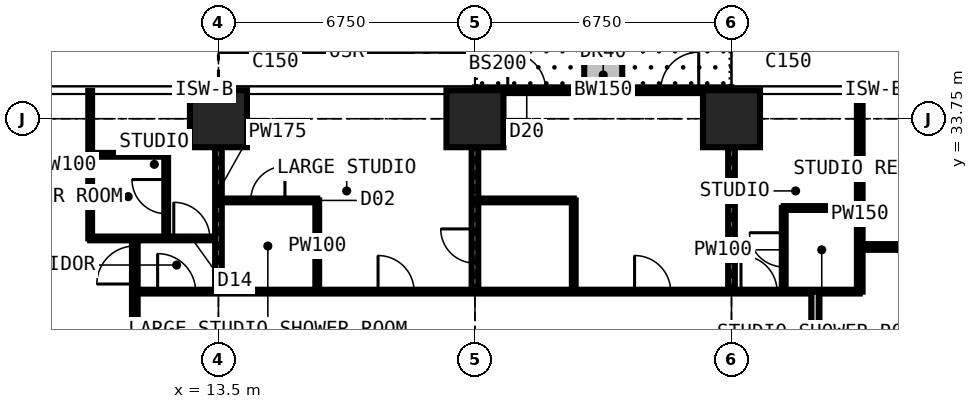
"""IFC4 building model, lengths in metres.
Left out: names, types, materials, properties, quantities, classifications, styles, units other than length and angle.
Written with IfcOpenShell. Run it as: python <this file> out.ifc"""

import sys

from ifc_helpers import new_model, si_unit, direction, frame, frame_2d, origin, origin_2d, place, context, subcontext, project, spatial, rectangle, extrude, element, fill, save


model = new_model("IFC4")
c1 = context("Model", 3, precision=1e-05, world=origin(), true_north=direction((0.0, 1.0)))
c2 = subcontext(c1, "Body", "Model", "MODEL_VIEW")
j1 = project(units=[si_unit("LENGTHUNIT", "METRE"), si_unit("PLANEANGLEUNIT", "RADIAN")], contexts=[c1])
p1 = place(None, origin())
s1 = spatial("IfcSite", under=j1, at=p1, CompositionType="ELEMENT")
p2 = place(p1, origin())
s2 = spatial("IfcBuilding", under=s1, at=p2, CompositionType="ELEMENT")
p3 = place(p2, frame((0.0, 0.0, 112.5)))
s3 = spatial("IfcBuildingStorey", under=s2, at=p3, CompositionType="ELEMENT", Elevation=112.5)
for number, where, z_axis, x_axis in (
    (1, (13.5, 33.75, 0.0), (0.0, 0.0, 1.0), (1.0, 0.0, 0.0)),
    (2, (20.25, 33.75, 0.0), (0.0, 0.0, 1.0), (1.0, 0.0, 0.0)),
    (3, (27.0, 33.75, 0.0), (0.0, 0.0, 1.0), (1.0, 0.0, 0.0)),
):
    element("IfcColumn", number, at=place(p3, frame(where, z_axis=z_axis, x_axis=x_axis)), inside=s3, PredefinedType="COLUMN", context=c2, shape_type="SweptSolid", body=[
        extrude(rectangle(XDim=1.5, YDim=1.5, at=origin_2d()), origin(), (0.0, 0.0, 1.0), 3.6),
    ])
p4 = place(p3, frame((20.25, 34.5, 0.0), z_axis=(0.0, 0.0, 1.0), x_axis=(1.0, 0.0, 0.0)))
e4 = element("IfcWall", 4, at=p4, inside=s3, PredefinedType="SOLIDWALL", context=c2, shape_type="SweptSolid", body=[
    extrude(rectangle(XDim=6.75, YDim=0.15, at=frame_2d((3.375, 0.0))), origin(), (0.0, 0.0, 1.0), 3.375),
])
p5 = place(p4, frame((0.863, 0.0, 0.0)))
e5 = element("IfcOpeningElement", 5, at=p5, cuts=e4, PredefinedType="OPENING", context=c2, shape_type="SweptSolid", body=[
    extrude(rectangle(XDim=1.0, YDim=2.2, at=frame_2d((0.5, 1.1))), frame((0.0, 0.085, 0.0), z_axis=(0.0, -1.0, 0.0), x_axis=(1.0, 0.0, 0.0)), (0.0, 0.0, 1.0), 0.17),
])
p6 = place(p4, frame((1.975, 0.0, 0.9)))
e6 = element("IfcOpeningElement", 6, at=p6, cuts=e4, PredefinedType="OPENING", context=c2, shape_type="SweptSolid", body=[
    extrude(rectangle(XDim=1.2, YDim=1.8, at=frame_2d((0.6, 0.9))), frame((0.0, 0.085, 0.0), z_axis=(0.0, -1.0, 0.0), x_axis=(1.0, 0.0, 0.0)), (0.0, 0.0, 1.0), 0.17),
])
p7 = place(p4, frame((4.887, 0.0, 0.0)))
e7 = element("IfcOpeningElement", 7, at=p7, cuts=e4, PredefinedType="OPENING", context=c2, shape_type="SweptSolid", body=[
    extrude(rectangle(XDim=1.0, YDim=2.2, at=frame_2d((0.5, 1.1))), frame((0.0, 0.085, 0.0), z_axis=(0.0, -1.0, 0.0), x_axis=(1.0, 0.0, 0.0)), (0.0, 0.0, 1.0), 0.17),
])
p8 = place(p4, frame((3.575, 0.0, 0.9)))
e8 = element("IfcOpeningElement", 8, at=p8, cuts=e4, PredefinedType="OPENING", context=c2, shape_type="SweptSolid", body=[
    extrude(rectangle(XDim=1.2, YDim=1.8, at=frame_2d((0.6, 0.9))), frame((0.0, 0.085, 0.0), z_axis=(0.0, -1.0, 0.0), x_axis=(1.0, 0.0, 0.0)), (0.0, 0.0, 1.0), 0.17),
])
p9 = place(p3, frame((23.625, 34.6, 0.0), z_axis=(0.0, 0.0, 1.0), x_axis=(0.0, 1.0, 0.0)))
e9 = element("IfcWall", 9, at=p9, inside=s3, PredefinedType="USERDEFINED", context=c2, shape_type="SweptSolid", body=[
    extrude(rectangle(XDim=2.2, YDim=1.0, at=frame_2d((1.1, 0.0))), origin(), (0.0, 0.0, 1.0), 0.9),
])
p10 = place(p3, frame((10.125, 30.6, 0.0), z_axis=(0.0, 0.0, 1.0), x_axis=(0.0, 1.0, 0.0)))
e10 = element("IfcWall", 10, at=p10, inside=s3, PredefinedType="PARTITIONING", context=c2, shape_type="SweptSolid", body=[
    extrude(rectangle(XDim=3.884, YDim=0.1, at=frame_2d((1.942, 0.0))), origin(), (0.0, 0.0, 1.0), 3.375),
])
p11 = place(p3, frame((10.125, 30.6, 0.0), z_axis=(0.0, 0.0, 1.0), x_axis=(1.0, 0.0, 0.0)))
e11 = element("IfcWall", 11, at=p11, inside=s3, PredefinedType="PARTITIONING", context=c2, shape_type="SweptSolid", body=[
    extrude(rectangle(XDim=3.375, YDim=0.1, at=frame_2d((1.688, 0.0))), origin(), (0.0, 0.0, 1.0), 3.375),
])
p12 = place(p11, frame((2.2, 0.0, 0.0)))
e12 = element("IfcOpeningElement", 12, at=p12, cuts=e11, PredefinedType="OPENING", context=c2, shape_type="SweptSolid", body=[
    extrude(rectangle(XDim=0.95, YDim=2.2, at=frame_2d((0.475, 1.1))), frame((0.0, 0.06, 0.0), z_axis=(0.0, -1.0, 0.0), x_axis=(1.0, 0.0, 0.0)), (0.0, 0.0, 1.0), 0.12),
])
p13 = place(p3, frame((10.125, 32.8, 0.0), z_axis=(0.0, 0.0, 1.0), x_axis=(1.0, 0.0, 0.0)))
e13 = element("IfcWall", 13, at=p13, inside=s3, PredefinedType="PARTITIONING", context=c2, shape_type="SweptSolid", body=[
    extrude(rectangle(XDim=2.0, YDim=0.1, at=frame_2d((1.0, 0.0))), origin(), (0.0, 0.0, 1.0), 3.375),
])
p14 = place(p3, frame((11.3, 11.3, 0.0), z_axis=(0.0, 0.0, 1.0), x_axis=(0.0, 1.0, 0.0)))
e14 = element("IfcWall", 14, at=p14, inside=s3, PredefinedType="PARTITIONING", context=c2, shape_type="SweptSolid", body=[
    extrude(rectangle(XDim=19.3, YDim=0.15, at=frame_2d((9.65, 0.0))), origin(), (0.0, 0.0, 1.0), 3.375),
])
p15 = place(p14, frame((18.1, 0.0, 0.0)))
e15 = element("IfcOpeningElement", 15, at=p15, cuts=e14, PredefinedType="OPENING", context=c2, shape_type="SweptSolid", body=[
    extrude(rectangle(XDim=1.0, YDim=2.2, at=frame_2d((0.5, 1.1))), frame((0.0, 0.085, 0.0), z_axis=(0.0, -1.0, 0.0), x_axis=(1.0, 0.0, 0.0)), (0.0, 0.0, 1.0), 0.17),
])
p16 = place(p14, frame((10.137, 0.0, 0.0)))
e16 = element("IfcOpeningElement", 16, at=p16, cuts=e14, PredefinedType="OPENING", context=c2, shape_type="SweptSolid", body=[
    extrude(rectangle(XDim=1.0, YDim=2.2, at=frame_2d((0.5, 1.1))), frame((0.0, 0.085, 0.0), z_axis=(0.0, -1.0, 0.0), x_axis=(1.0, 0.0, 0.0)), (0.0, 0.0, 1.0), 0.17),
])
p17 = place(p3, frame((11.3, 29.2, 0.0), z_axis=(0.0, 0.0, 1.0), x_axis=(1.0, 0.0, 0.0)))
e17 = element("IfcWall", 17, at=p17, inside=s3, PredefinedType="PARTITIONING", context=c2, shape_type="SweptSolid", body=[
    extrude(rectangle(XDim=19.075, YDim=0.1, at=frame_2d((9.538, 0.0))), origin(), (0.0, 0.0, 1.0), 3.375),
])
p18 = place(p17, frame((6.4, 0.0, 0.0)))
e18 = element("IfcOpeningElement", 18, at=p18, cuts=e17, PredefinedType="OPENING", context=c2, shape_type="SweptSolid", body=[
    extrude(rectangle(XDim=0.95, YDim=2.2, at=frame_2d((0.475, 1.1))), frame((0.0, 0.06, 0.0), z_axis=(0.0, -1.0, 0.0), x_axis=(1.0, 0.0, 0.0)), (0.0, 0.0, 1.0), 0.12),
])
p19 = place(p17, frame((13.15, 0.0, 0.0)))
e19 = element("IfcOpeningElement", 19, at=p19, cuts=e17, PredefinedType="OPENING", context=c2, shape_type="SweptSolid", body=[
    extrude(rectangle(XDim=0.95, YDim=2.2, at=frame_2d((0.475, 1.1))), frame((0.0, 0.06, 0.0), z_axis=(0.0, -1.0, 0.0), x_axis=(1.0, 0.0, 0.0)), (0.0, 0.0, 1.0), 0.12),
])
p20 = place(p17, frame((15.95, 0.0, 0.0)))
e20 = element("IfcOpeningElement", 20, at=p20, cuts=e17, PredefinedType="OPENING", context=c2, shape_type="SweptSolid", body=[
    extrude(rectangle(XDim=0.95, YDim=2.2, at=frame_2d((0.475, 1.1))), frame((0.0, 0.06, 0.0), z_axis=(0.0, -1.0, 0.0), x_axis=(1.0, 0.0, 0.0)), (0.0, 0.0, 1.0), 0.12),
])
p21 = place(p17, frame((0.6, 0.0, 0.0)))
e21 = element("IfcOpeningElement", 21, at=p21, cuts=e17, PredefinedType="OPENING", context=c2, shape_type="SweptSolid", body=[
    extrude(rectangle(XDim=1.0, YDim=2.2, at=frame_2d((0.5, 1.1))), frame((0.0, 0.06, 0.0), z_axis=(0.0, -1.0, 0.0), x_axis=(1.0, 0.0, 0.0)), (0.0, 0.0, 1.0), 0.12),
])
p22 = place(p3, frame((12.125, 30.6, 0.0), z_axis=(0.0, 0.0, 1.0), x_axis=(0.0, 1.0, 0.0)))
e22 = element("IfcWall", 22, at=p22, inside=s3, PredefinedType="PARTITIONING", context=c2, shape_type="SweptSolid", body=[
    extrude(rectangle(XDim=2.2, YDim=0.1, at=frame_2d((1.1, 0.0))), origin(), (0.0, 0.0, 1.0), 3.375),
])
p23 = place(p22, frame((0.65, 0.0, 0.0)))
e23 = element("IfcOpeningElement", 23, at=p23, cuts=e22, PredefinedType="OPENING", context=c2, shape_type="SweptSolid", body=[
    extrude(rectangle(XDim=0.9, YDim=2.2, at=frame_2d((0.45, 1.1))), frame((0.0, 0.06, 0.0), z_axis=(0.0, -1.0, 0.0), x_axis=(1.0, 0.0, 0.0)), (0.0, 0.0, 1.0), 0.12),
])
p24 = place(p3, frame((13.5, 29.2, 0.0), z_axis=(0.0, 0.0, 1.0), x_axis=(0.0, 1.0, 0.0)))
e24 = element("IfcWall", 24, at=p24, inside=s3, PredefinedType="PARTITIONING", context=c2, shape_type="SweptSolid", body=[
    extrude(rectangle(XDim=5.284, YDim=0.175, at=frame_2d((2.642, 0.0))), origin(), (0.0, 0.0, 1.0), 2.61),
])
p25 = place(p3, frame((13.5, 31.6, 0.0), z_axis=(0.0, 0.0, 1.0), x_axis=(1.0, 0.0, 0.0)))
e25 = element("IfcWall", 25, at=p25, inside=s3, PredefinedType="PARTITIONING", context=c2, shape_type="SweptSolid", body=[
    extrude(rectangle(XDim=2.6, YDim=0.1, at=frame_2d((1.3, 0.0))), origin(), (0.0, 0.0, 1.0), 3.375),
])
p26 = place(p25, frame((0.85, 0.0, 0.0)))
e26 = element("IfcOpeningElement", 26, at=p26, cuts=e25, PredefinedType="OPENING", context=c2, shape_type="SweptSolid", body=[
    extrude(rectangle(XDim=0.9, YDim=2.2, at=frame_2d((0.45, 1.1))), frame((0.0, 0.06, 0.0), z_axis=(0.0, -1.0, 0.0), x_axis=(1.0, 0.0, 0.0)), (0.0, 0.0, 1.0), 0.12),
])
p27 = place(p3, frame((16.1, 29.2, 0.0), z_axis=(0.0, 0.0, 1.0), x_axis=(0.0, 1.0, 0.0)))
e27 = element("IfcWall", 27, at=p27, inside=s3, PredefinedType="PARTITIONING", context=c2, shape_type="SweptSolid", body=[
    extrude(rectangle(XDim=2.4, YDim=0.1, at=frame_2d((1.2, 0.0))), origin(), (0.0, 0.0, 1.0), 3.375),
])
p28 = place(p3, frame((20.25, 29.2, 0.0), z_axis=(0.0, 0.0, 1.0), x_axis=(0.0, 1.0, 0.0)))
e28 = element("IfcWall", 28, at=p28, inside=s3, PredefinedType="PARTITIONING", context=c2, shape_type="SweptSolid", body=[
    extrude(rectangle(XDim=5.284, YDim=0.175, at=frame_2d((2.642, 0.0))), origin(), (0.0, 0.0, 1.0), 2.61),
])
p29 = place(p28, frame((0.75, 0.0, 0.0)))
e29 = element("IfcOpeningElement", 29, at=p29, cuts=e28, PredefinedType="OPENING", context=c2, shape_type="SweptSolid", body=[
    extrude(rectangle(XDim=0.9, YDim=2.2, at=frame_2d((0.45, 1.1))), frame((0.0, 0.097, 0.0), z_axis=(0.0, -1.0, 0.0), x_axis=(1.0, 0.0, 0.0)), (0.0, 0.0, 1.0), 0.195),
])
p30 = place(p3, frame((20.25, 31.6, 0.0), z_axis=(0.0, 0.0, 1.0), x_axis=(1.0, 0.0, 0.0)))
e30 = element("IfcWall", 30, at=p30, inside=s3, PredefinedType="PARTITIONING", context=c2, shape_type="SweptSolid", body=[
    extrude(rectangle(XDim=2.6, YDim=0.1, at=frame_2d((1.3, 0.0))), origin(), (0.0, 0.0, 1.0), 3.375),
])
p31 = place(p3, frame((22.85, 29.2, 0.0), z_axis=(0.0, 0.0, 1.0), x_axis=(0.0, 1.0, 0.0)))
e31 = element("IfcWall", 31, at=p31, inside=s3, PredefinedType="PARTITIONING", context=c2, shape_type="SweptSolid", body=[
    extrude(rectangle(XDim=2.4, YDim=0.1, at=frame_2d((1.2, 0.0))), origin(), (0.0, 0.0, 1.0), 3.375),
])
p32 = place(p3, frame((27.0, 29.2, 0.0), z_axis=(0.0, 0.0, 1.0), x_axis=(0.0, 1.0, 0.0)))
e32 = element("IfcWall", 32, at=p32, inside=s3, PredefinedType="PARTITIONING", context=c2, shape_type="SweptSolid", body=[
    extrude(rectangle(XDim=5.284, YDim=0.175, at=frame_2d((2.642, 0.0))), origin(), (0.0, 0.0, 1.0), 2.806),
])
p33 = place(p3, frame((28.375, 29.2, 0.0), z_axis=(0.0, 0.0, 1.0), x_axis=(0.0, 1.0, 0.0)))
e33 = element("IfcWall", 33, at=p33, inside=s3, PredefinedType="PARTITIONING", context=c2, shape_type="SweptSolid", body=[
    extrude(rectangle(XDim=2.2, YDim=0.1, at=frame_2d((1.1, 0.0))), origin(), (0.0, 0.0, 1.0), 3.375),
])
p34 = place(p33, frame((0.65, 0.0, 0.0)))
e34 = element("IfcOpeningElement", 34, at=p34, cuts=e33, PredefinedType="OPENING", context=c2, shape_type="SweptSolid", body=[
    extrude(rectangle(XDim=0.9, YDim=2.2, at=frame_2d((0.45, 1.1))), frame((0.0, 0.06, 0.0), z_axis=(0.0, -1.0, 0.0), x_axis=(1.0, 0.0, 0.0)), (0.0, 0.0, 1.0), 0.12),
])
p35 = place(p3, frame((28.375, 31.4, 0.0), z_axis=(0.0, 0.0, 1.0), x_axis=(1.0, 0.0, 0.0)))
e35 = element("IfcWall", 35, at=p35, inside=s3, PredefinedType="PARTITIONING", context=c2, shape_type="SweptSolid", body=[
    extrude(rectangle(XDim=2.0, YDim=0.1, at=frame_2d((1.0, 0.0))), origin(), (0.0, 0.0, 1.0), 3.375),
])
p36 = place(p3, frame((29.2, 11.3, 0.0), z_axis=(0.0, 0.0, 1.0), x_axis=(0.0, 1.0, 0.0)))
e36 = element("IfcWall", 36, at=p36, inside=s3, PredefinedType="PARTITIONING", context=c2, shape_type="SweptSolid", body=[
    extrude(rectangle(XDim=17.9, YDim=0.2, at=frame_2d((8.95, 0.0))), origin(), (0.0, 0.0, 1.0), 3.375),
])
p37 = place(p36, frame((8.35, 0.0, 0.0)))
e37 = element("IfcOpeningElement", 37, at=p37, cuts=e36, PredefinedType="OPENING", context=c2, shape_type="SweptSolid", body=[
    extrude(rectangle(XDim=1.2, YDim=2.2, at=frame_2d((0.6, 1.1))), frame((0.0, 0.11, 0.0), z_axis=(0.0, -1.0, 0.0), x_axis=(1.0, 0.0, 0.0)), (0.0, 0.0, 1.0), 0.22),
])
p38 = place(p3, frame((30.375, 29.2, 0.0), z_axis=(0.0, 0.0, 1.0), x_axis=(0.0, 1.0, 0.0)))
e38 = element("IfcWall", 38, at=p38, inside=s3, PredefinedType="PARTITIONING", context=c2, shape_type="SweptSolid", body=[
    extrude(rectangle(XDim=5.284, YDim=0.15, at=frame_2d((2.642, 0.0))), origin(), (0.0, 0.0, 1.0), 3.375),
])
p39 = place(p3, frame((30.375, 30.375, 0.0), z_axis=(0.0, 0.0, 1.0), x_axis=(1.0, 0.0, 0.0)))
e39 = element("IfcWall", 39, at=p39, inside=s3, PredefinedType="PARTITIONING", context=c2, shape_type="SweptSolid", body=[
    extrude(rectangle(XDim=7.35, YDim=0.15, at=frame_2d((3.675, 0.0))), origin(), (0.0, 0.0, 1.0), 2.877),
])
p40 = place(p39, frame((5.225, 0.0, 0.0)))
e40 = element("IfcOpeningElement", 40, at=p40, cuts=e39, PredefinedType="OPENING", context=c2, shape_type="SweptSolid", body=[
    extrude(rectangle(XDim=1.0, YDim=2.2, at=frame_2d((0.5, 1.1))), frame((0.0, 0.085, 0.0), z_axis=(0.0, -1.0, 0.0), x_axis=(1.0, 0.0, 0.0)), (0.0, 0.0, 1.0), 0.17),
])
p41 = place(p5, origin())
e41 = element("IfcDoor", 41, at=p41, inside=s3, OperationType="SINGLE_SWING_LEFT", PredefinedType="DOOR", context=c2, shape_type="SweptSolid", body=[
    extrude(rectangle(XDim=1.0, YDim=2.2, at=frame_2d((0.5, 1.1))), frame((0.0, 0.025, 0.0), z_axis=(0.0, -1.0, 0.0), x_axis=(1.0, 0.0, 0.0)), (0.0, 0.0, 1.0), 0.05),
])
fill(e5, e41)
p42 = place(p6, origin())
e42 = element("IfcWindow", 42, at=p42, inside=s3, PartitioningType="SINGLE_PANEL", PredefinedType="WINDOW", context=c2, shape_type="SweptSolid", body=[
    extrude(rectangle(XDim=1.2, YDim=1.8, at=frame_2d((0.6, 0.9))), frame((0.0, 0.03, 0.0), z_axis=(0.0, -1.0, 0.0), x_axis=(1.0, 0.0, 0.0)), (0.0, 0.0, 1.0), 0.06),
])
fill(e6, e42)
p43 = place(p7, origin())
e43 = element("IfcDoor", 43, at=p43, inside=s3, OperationType="SINGLE_SWING_RIGHT", PredefinedType="DOOR", context=c2, shape_type="SweptSolid", body=[
    extrude(rectangle(XDim=1.0, YDim=2.2, at=frame_2d((0.5, 1.1))), frame((0.0, 0.025, 0.0), z_axis=(0.0, -1.0, 0.0), x_axis=(1.0, 0.0, 0.0)), (0.0, 0.0, 1.0), 0.05),
])
fill(e7, e43)
p44 = place(p8, origin())
e44 = element("IfcWindow", 44, at=p44, inside=s3, PartitioningType="SINGLE_PANEL", PredefinedType="WINDOW", context=c2, shape_type="SweptSolid", body=[
    extrude(rectangle(XDim=1.2, YDim=1.8, at=frame_2d((0.6, 0.9))), frame((0.0, 0.03, 0.0), z_axis=(0.0, -1.0, 0.0), x_axis=(1.0, 0.0, 0.0)), (0.0, 0.0, 1.0), 0.06),
])
fill(e8, e44)
p45 = place(p18, origin())
e45 = element("IfcDoor", 45, at=p45, inside=s3, OperationType="SINGLE_SWING_LEFT", PredefinedType="DOOR", context=c2, shape_type="SweptSolid", body=[
    extrude(rectangle(XDim=0.95, YDim=2.2, at=frame_2d((0.475, 1.1))), frame((0.0, 0.025, 0.0), z_axis=(0.0, -1.0, 0.0), x_axis=(1.0, 0.0, 0.0)), (0.0, 0.0, 1.0), 0.05),
])
fill(e18, e45)
p46 = place(p26, origin())
e46 = element("IfcDoor", 46, at=p46, inside=s3, OperationType="SINGLE_SWING_RIGHT", PredefinedType="DOOR", context=c2, shape_type="SweptSolid", body=[
    extrude(rectangle(XDim=0.9, YDim=2.2, at=frame_2d((0.45, 1.1))), frame((0.0, 0.025, 0.0), z_axis=(0.0, -1.0, 0.0), x_axis=(1.0, 0.0, 0.0)), (0.0, 0.0, 1.0), 0.05),
])
fill(e26, e46)
p47 = place(p19, origin())
e47 = element("IfcDoor", 47, at=p47, inside=s3, OperationType="SINGLE_SWING_LEFT", PredefinedType="DOOR", context=c2, shape_type="SweptSolid", body=[
    extrude(rectangle(XDim=0.95, YDim=2.2, at=frame_2d((0.475, 1.1))), frame((0.0, 0.025, 0.0), z_axis=(0.0, -1.0, 0.0), x_axis=(1.0, 0.0, 0.0)), (0.0, 0.0, 1.0), 0.05),
])
fill(e19, e47)
p48 = place(p29, origin())
e48 = element("IfcDoor", 48, at=p48, inside=s3, OperationType="SINGLE_SWING_RIGHT", PredefinedType="DOOR", context=c2, shape_type="SweptSolid", body=[
    extrude(rectangle(XDim=0.9, YDim=2.2, at=frame_2d((0.45, 1.1))), frame((0.0, 0.025, 0.0), z_axis=(0.0, -1.0, 0.0), x_axis=(1.0, 0.0, 0.0)), (0.0, 0.0, 1.0), 0.05),
])
fill(e29, e48)
p49 = place(p12, origin())
e49 = element("IfcDoor", 49, at=p49, inside=s3, OperationType="SINGLE_SWING_LEFT", PredefinedType="DOOR", context=c2, shape_type="SweptSolid", body=[
    extrude(rectangle(XDim=0.95, YDim=2.2, at=frame_2d((0.475, 1.1))), frame((0.0, 0.025, 0.0), z_axis=(0.0, -1.0, 0.0), x_axis=(1.0, 0.0, 0.0)), (0.0, 0.0, 1.0), 0.05),
])
fill(e12, e49)
p50 = place(p23, origin())
e50 = element("IfcDoor", 50, at=p50, inside=s3, OperationType="SINGLE_SWING_RIGHT", PredefinedType="DOOR", context=c2, shape_type="SweptSolid", body=[
    extrude(rectangle(XDim=0.9, YDim=2.2, at=frame_2d((0.45, 1.1))), frame((0.0, 0.025, 0.0), z_axis=(0.0, -1.0, 0.0), x_axis=(1.0, 0.0, 0.0)), (0.0, 0.0, 1.0), 0.05),
])
fill(e23, e50)
p51 = place(p20, origin())
e51 = element("IfcDoor", 51, at=p51, inside=s3, OperationType="SINGLE_SWING_LEFT", PredefinedType="DOOR", context=c2, shape_type="SweptSolid", body=[
    extrude(rectangle(XDim=0.95, YDim=2.2, at=frame_2d((0.475, 1.1))), frame((0.0, 0.025, 0.0), z_axis=(0.0, -1.0, 0.0), x_axis=(1.0, 0.0, 0.0)), (0.0, 0.0, 1.0), 0.05),
])
fill(e20, e51)
p52 = place(p34, origin())
e52 = element("IfcDoor", 52, at=p52, inside=s3, OperationType="SINGLE_SWING_RIGHT", PredefinedType="DOOR", context=c2, shape_type="SweptSolid", body=[
    extrude(rectangle(XDim=0.9, YDim=2.2, at=frame_2d((0.45, 1.1))), frame((0.0, 0.025, 0.0), z_axis=(0.0, -1.0, 0.0), x_axis=(1.0, 0.0, 0.0)), (0.0, 0.0, 1.0), 0.05),
])
fill(e34, e52)
p53 = place(p21, origin())
e53 = element("IfcDoor", 53, at=p53, inside=s3, OperationType="SINGLE_SWING_LEFT", PredefinedType="DOOR", context=c2, shape_type="SweptSolid", body=[
    extrude(rectangle(XDim=1.0, YDim=2.2, at=frame_2d((0.5, 1.1))), frame((0.0, 0.025, 0.0), z_axis=(0.0, -1.0, 0.0), x_axis=(1.0, 0.0, 0.0)), (0.0, 0.0, 1.0), 0.05),
])
fill(e21, e53)
p54 = place(p15, origin())
e54 = element("IfcDoor", 54, at=p54, inside=s3, OperationType="SINGLE_SWING_LEFT", PredefinedType="DOOR", context=c2, shape_type="SweptSolid", body=[
    extrude(rectangle(XDim=1.0, YDim=2.2, at=frame_2d((0.5, 1.1))), frame((0.0, 0.025, 0.0), z_axis=(0.0, -1.0, 0.0), x_axis=(1.0, 0.0, 0.0)), (0.0, 0.0, 1.0), 0.05),
])
fill(e15, e54)
save(model, sys.argv[1])
